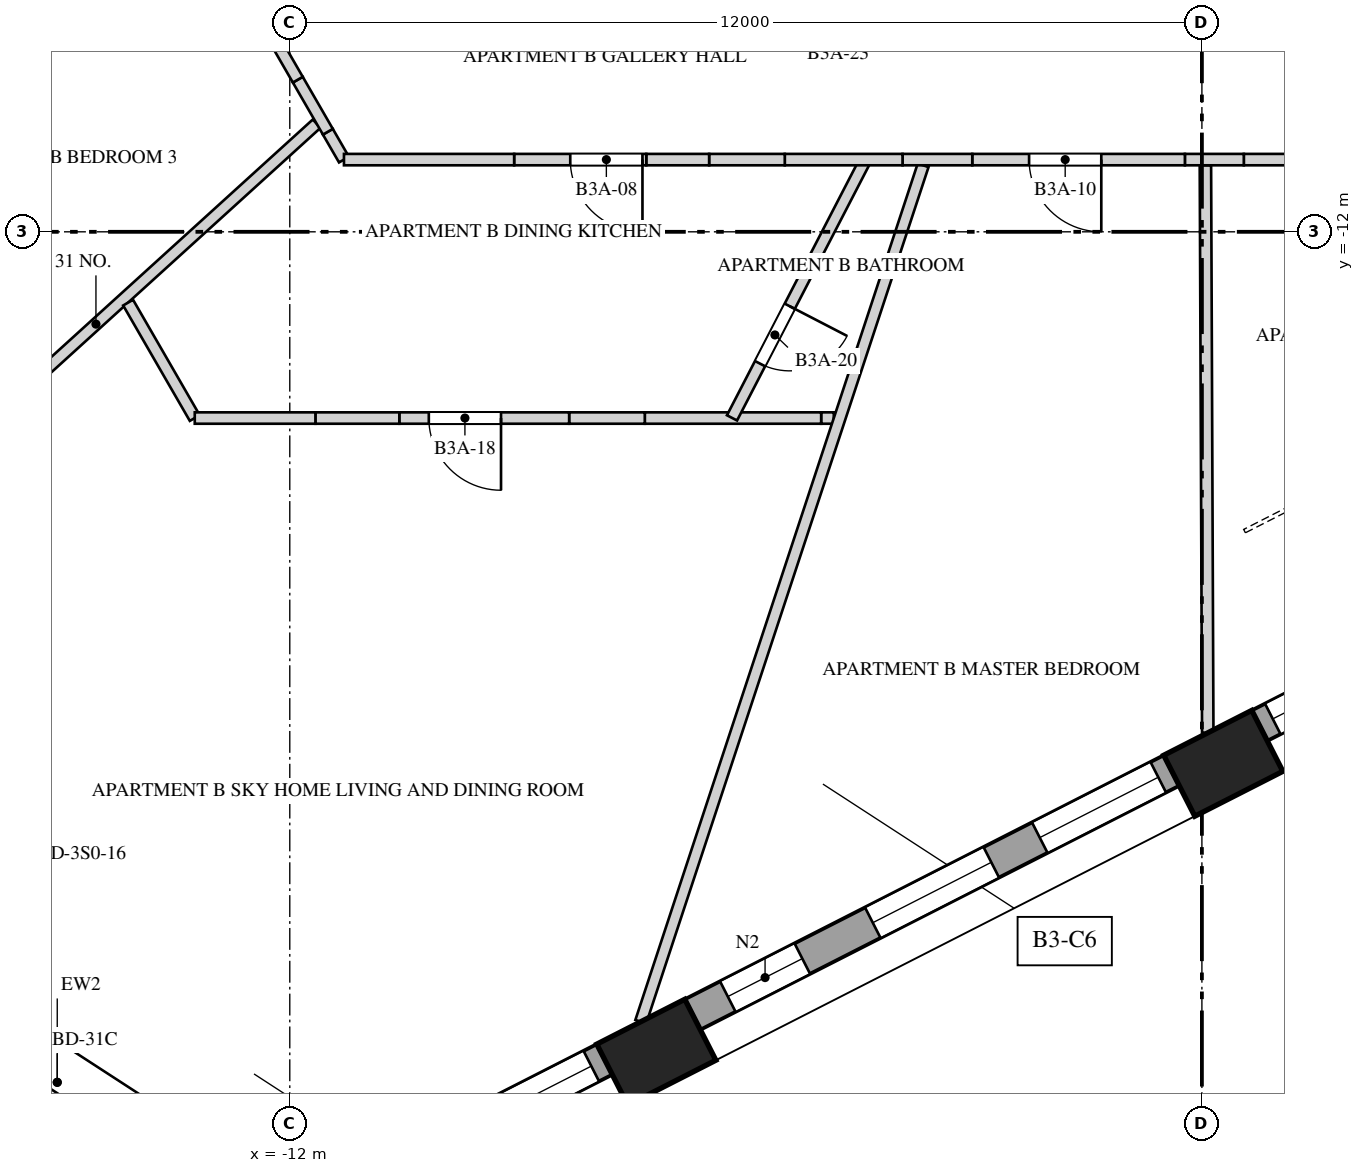
"""IFC4 building model, lengths in metres.
Left out: names, types, materials, properties, quantities, classifications, styles, units other than length and angle.
Written with IfcOpenShell. Run it as: python <this file> out.ifc"""

import sys

from ifc_helpers import new_model, si_unit, direction, frame, frame_2d, origin, origin_2d, place, context, subcontext, project, spatial, polyline, rectangle, outline, extrude, element, fill, save


model = new_model("IFC4")
c1 = context("Model", 3, precision=1e-05, world=origin(), true_north=direction((0.0, 1.0)))
c2 = subcontext(c1, "Body", "Model", "MODEL_VIEW")
j1 = project(units=[si_unit("LENGTHUNIT", "METRE"), si_unit("PLANEANGLEUNIT", "RADIAN")], contexts=[c1])
p1 = place(None, origin())
s1 = spatial("IfcSite", under=j1, at=p1, CompositionType="ELEMENT")
p2 = place(p1, origin())
s2 = spatial("IfcBuilding", under=s1, at=p2, CompositionType="ELEMENT")
p3 = place(p2, frame((0.0, 0.0, 133.6)))
s3 = spatial("IfcBuildingStorey", under=s2, at=p3, CompositionType="ELEMENT", Elevation=133.6)
for number, where, z_axis, x_axis in (
    (1, (-7.178, -22.793, 0.0), (0.0, 0.0, 1.0), (0.891, 0.454, 0.0)),
    (2, (0.281, -18.992, 0.0), (0.0, 0.0, 1.0), (0.891, 0.454, 0.0)),
):
    element("IfcColumn", number, at=place(p3, frame(where, z_axis=z_axis, x_axis=x_axis)), inside=s3, PredefinedType="COLUMN", context=c2, shape_type="SweptSolid", body=[
        extrude(rectangle(XDim=1.3, YDim=0.9, at=origin_2d()), origin(), (0.0, 0.0, 1.0), 4.0),
    ])
p4 = place(p3, frame((-13.581, -25.803, 0.0), z_axis=(0.0, 0.0, 1.0), x_axis=(0.891010191031, 0.453983303085, 0.0)))
e3 = element("IfcWall", 3, at=p4, inside=s3, PredefinedType="SOLIDWALL", context=c2, shape_type="SweptSolid", body=[
    extrude(rectangle(XDim=6.422, YDim=0.45, at=frame_2d((3.211, 0.0))), origin(), (0.0, 0.0, 1.0), 3.3),
])
p5 = place(p4, frame((0.195, 0.0, 0.5)))
e4 = element("IfcOpeningElement", 4, at=p5, cuts=e3, PredefinedType="OPENING", context=c2, shape_type="SweptSolid", body=[
    extrude(rectangle(XDim=1.1, YDim=2.0, at=frame_2d((0.55, 1.0))), frame((0.0, 0.235, 0.0), z_axis=(0.0, -1.0, 0.0), x_axis=(1.0, 0.0, 0.0)), (0.0, 0.0, 1.0), 0.47),
])
p6 = place(p4, frame((2.011, 0.0, 0.5)))
e5 = element("IfcOpeningElement", 5, at=p6, cuts=e3, PredefinedType="OPENING", context=c2, shape_type="SweptSolid", body=[
    extrude(rectangle(XDim=1.75, YDim=2.65, at=frame_2d((0.875, 1.325))), frame((0.0, 0.235, 0.0), z_axis=(0.0, -1.0, 0.0), x_axis=(1.0, 0.0, 0.0)), (0.0, 0.0, 1.0), 0.47),
])
p7 = place(p4, frame((4.476, 0.0, 0.5)))
e6 = element("IfcOpeningElement", 6, at=p7, cuts=e3, PredefinedType="OPENING", context=c2, shape_type="SweptSolid", body=[
    extrude(rectangle(XDim=1.75, YDim=2.65, at=frame_2d((0.875, 1.325))), frame((0.0, 0.235, 0.0), z_axis=(0.0, -1.0, 0.0), x_axis=(1.0, 0.0, 0.0)), (0.0, 0.0, 1.0), 0.47),
])
p8 = place(p3, frame((-6.701, -22.297, 0.0), z_axis=(0.0, 0.0, 1.0), x_axis=(0.891004189171, 0.45399508244, 0.0)))
e7 = element("IfcWall", 7, at=p8, inside=s3, PredefinedType="SOLIDWALL", context=c2, shape_type="SweptSolid", body=[
    extrude(rectangle(XDim=7.072, YDim=0.45, at=frame_2d((3.536, 0.0))), origin(), (0.0, 0.0, 1.0), 3.3),
])
p9 = place(p8, frame((0.52, 0.0, 0.5)))
e8 = element("IfcOpeningElement", 8, at=p9, cuts=e7, PredefinedType="OPENING", context=c2, shape_type="SweptSolid", body=[
    extrude(rectangle(XDim=1.1, YDim=2.65, at=frame_2d((0.55, 1.325))), frame((0.0, 0.235, 0.0), z_axis=(0.0, -1.0, 0.0), x_axis=(1.0, 0.0, 0.0)), (0.0, 0.0, 1.0), 0.47),
])
p10 = place(p8, frame((2.661, 0.0, 0.5)))
e9 = element("IfcOpeningElement", 9, at=p10, cuts=e7, PredefinedType="OPENING", context=c2, shape_type="SweptSolid", body=[
    extrude(rectangle(XDim=1.75, YDim=2.65, at=frame_2d((0.875, 1.325))), frame((0.0, 0.235, 0.0), z_axis=(0.0, -1.0, 0.0), x_axis=(1.0, 0.0, 0.0)), (0.0, 0.0, 1.0), 0.47),
])
p11 = place(p8, frame((5.126, 0.0, 0.5)))
e10 = element("IfcOpeningElement", 10, at=p11, cuts=e7, PredefinedType="OPENING", context=c2, shape_type="SweptSolid", body=[
    extrude(rectangle(XDim=1.75, YDim=2.65, at=frame_2d((0.875, 1.325))), frame((0.0, 0.235, 0.0), z_axis=(0.0, -1.0, 0.0), x_axis=(1.0, 0.0, 0.0)), (0.0, 0.0, 1.0), 0.47),
])
p12 = place(p3, frame((0.758, -18.497, 0.0), z_axis=(0.0, 0.0, 1.0), x_axis=(0.890979432498, 0.454043666254, 0.0)))
e11 = element("IfcWall", 11, at=p12, inside=s3, PredefinedType="SOLIDWALL", context=c2, shape_type="SweptSolid", body=[
    extrude(rectangle(XDim=2.141, YDim=0.45, at=frame_2d((1.07, 0.0))), origin(), (0.0, 0.0, 1.0), 3.3),
])
p13 = place(p12, frame((0.195, 0.0, 0.5)))
e12 = element("IfcOpeningElement", 12, at=p13, cuts=e11, PredefinedType="OPENING", context=c2, shape_type="SweptSolid", body=[
    extrude(rectangle(XDim=1.75, YDim=2.65, at=frame_2d((0.875, 1.325))), frame((0.0, 0.235, 0.0), z_axis=(0.0, -1.0, 0.0), x_axis=(1.0, 0.0, 0.0)), (0.0, 0.0, 1.0), 0.47),
])
p14 = place(p3, frame((-13.592, -24.142, 0.0), z_axis=(0.0, 0.0, 1.0), x_axis=(-0.838665071449, 0.544647498784, 0.0)))
e13 = element("IfcWall", 13, at=p14, inside=s3, PredefinedType="SOLIDWALL", context=c2, shape_type="SweptSolid", body=[
    extrude(rectangle(XDim=3.5, YDim=0.9, at=frame_2d((1.75, 0.0))), origin(), (0.0, 0.0, 1.0), 3.3),
])
p15 = place(p14, frame((0.75, 0.0, 0.0)))
e14 = element("IfcOpeningElement", 14, at=p15, cuts=e13, PredefinedType="OPENING", context=c2, shape_type="SweptSolid", body=[
    extrude(rectangle(XDim=2.0, YDim=2.4, at=frame_2d((1.0, 1.2))), frame((0.0, 0.46, 0.0), z_axis=(0.0, -1.0, 0.0), x_axis=(1.0, 0.0, 0.0)), (0.0, 0.0, 1.0), 0.92),
])
p16 = place(p3, frame((-17.454, -15.851, 0.0), z_axis=(0.0, 0.0, 1.0), x_axis=(0.740276567096, 0.672302464824, 0.0)))
e15 = element("IfcWall", 15, at=p16, inside=s3, PredefinedType="PARTITIONING", context=c2, shape_type="SweptSolid", body=[
    extrude(rectangle(XDim=7.844, YDim=0.15, at=frame_2d((3.922, 0.0))), origin(), (0.0, 0.0, 1.0), 2.75),
])
p17 = place(p3, frame((-13.25, -14.45, 0.0), z_axis=(0.0, 0.0, 1.0), x_axis=(-0.500047902311, 0.865997745606, 0.0)))
e16 = element("IfcWall", 16, at=p17, inside=s3, PredefinedType="PARTITIONING", context=c2, shape_type="SweptSolid", body=[
    extrude(rectangle(XDim=1.753, YDim=0.15, at=frame_2d((0.876, 0.0))), origin(), (0.0, 0.0, 1.0), 3.65),
])
p18 = place(p3, frame((-11.287, -11.05, 0.0), z_axis=(0.0, 0.0, 1.0), x_axis=(-0.499489419809, 0.866319986782, 0.0)))
e17 = element("IfcWall", 17, at=p18, inside=s3, PredefinedType="PARTITIONING", context=c2, shape_type="SweptSolid", body=[
    extrude(rectangle(XDim=0.423, YDim=0.15, at=frame_2d((0.212, 0.0))), origin(), (0.0, 0.0, 1.0), 3.65),
])
p19 = place(p3, frame((-11.499, -10.683, 0.0), z_axis=(0.0, 0.0, 1.0), x_axis=(-0.50012328804, 0.865954211699, 0.0)))
e18 = element("IfcWall", 18, at=p19, inside=s3, PredefinedType="PARTITIONING", context=c2, shape_type="SweptSolid", body=[
    extrude(rectangle(XDim=0.791, YDim=0.15, at=frame_2d((0.396, 0.0))), origin(), (0.0, 0.0, 1.0), 2.75),
])
p20 = place(p3, frame((-11.894, -9.999, 0.0), z_axis=(0.0, 0.0, 1.0), x_axis=(-0.500000251441, 0.866025258615, 0.0)))
e19 = element("IfcWall", 19, at=p20, inside=s3, PredefinedType="PARTITIONING", context=c2, shape_type="SweptSolid", body=[
    extrude(rectangle(XDim=4.209, YDim=0.15, at=frame_2d((2.105, 0.0))), origin(), (0.0, 0.0, 1.0), 3.65),
])
p21 = place(p20, frame((1.313, 0.0, 0.0)))
e20 = element("IfcOpeningElement", 20, at=p21, cuts=e19, PredefinedType="OPENING", context=c2, shape_type="SweptSolid", body=[
    extrude(rectangle(XDim=0.95, YDim=2.4, at=frame_2d((0.475, 1.2))), frame((0.0, 0.085, 0.0), z_axis=(0.0, -1.0, 0.0), x_axis=(1.0, 0.0, 0.0)), (0.0, 0.0, 1.0), 0.17),
])
p22 = place(p3, frame((-4.843, -14.45, 0.0), z_axis=(0.0, 0.0, 1.0), x_axis=(-1.0, 0.0, 0.0)))
e21 = element("IfcWall", 21, at=p22, inside=s3, PredefinedType="PARTITIONING", context=c2, shape_type="SweptSolid", body=[
    extrude(rectangle(XDim=0.166, YDim=0.15, at=frame_2d((0.083, 0.0))), origin(), (0.0, 0.0, 1.0), 2.55),
])
p23 = place(p3, frame((-5.009, -14.45, 0.0), z_axis=(0.0, 0.0, 1.0), x_axis=(-1.0, 0.0, 0.0)))
e22 = element("IfcWall", 22, at=p23, inside=s3, PredefinedType="PARTITIONING", context=c2, shape_type="SweptSolid", body=[
    extrude(rectangle(XDim=2.321, YDim=0.15, at=frame_2d((1.16, 0.0))), origin(), (0.0, 0.0, 1.0), 3.65),
])
p24 = place(p3, frame((-7.33, -14.45, 0.0), z_axis=(0.0, 0.0, 1.0), x_axis=(-1.0, 0.0, 0.0)))
e23 = element("IfcWall", 23, at=p24, inside=s3, PredefinedType="PARTITIONING", context=c2, shape_type="SweptSolid", body=[
    extrude(rectangle(XDim=0.995, YDim=0.15, at=frame_2d((0.498, 0.0))), origin(), (0.0, 0.0, 1.0), 2.55),
])
p25 = place(p3, frame((-8.325, -14.45, 0.0), z_axis=(0.0, 0.0, 1.0), x_axis=(-1.0, 0.0, 0.0)))
e24 = element("IfcWall", 24, at=p25, inside=s3, PredefinedType="PARTITIONING", context=c2, shape_type="SweptSolid", body=[
    extrude(rectangle(XDim=2.234, YDim=0.15, at=frame_2d((1.117, 0.0))), origin(), (0.0, 0.0, 1.0), 3.65),
])
p26 = place(p25, frame((0.896, 0.0, 0.0)))
e25 = element("IfcOpeningElement", 25, at=p26, cuts=e24, PredefinedType="OPENING", context=c2, shape_type="SweptSolid", body=[
    extrude(rectangle(XDim=0.95, YDim=2.4, at=frame_2d((0.475, 1.2))), frame((0.0, 0.085, 0.0), z_axis=(0.0, -1.0, 0.0), x_axis=(1.0, 0.0, 0.0)), (0.0, 0.0, 1.0), 0.17),
])
p27 = place(p3, frame((-10.559, -14.45, 0.0), z_axis=(0.0, 0.0, 1.0), x_axis=(-1.0, 0.0, 0.0)))
e26 = element("IfcWall", 26, at=p27, inside=s3, PredefinedType="PARTITIONING", context=c2, shape_type="SweptSolid", body=[
    extrude(rectangle(XDim=1.104, YDim=0.15, at=frame_2d((0.552, 0.0))), origin(), (0.0, 0.0, 1.0), 2.55),
])
p28 = place(p3, frame((-11.663, -14.45, 0.0), z_axis=(0.0, 0.0, 1.0), x_axis=(-1.0, 0.0, 0.0)))
e27 = element("IfcWall", 27, at=p28, inside=s3, PredefinedType="PARTITIONING", context=c2, shape_type="SweptSolid", body=[
    extrude(rectangle(XDim=1.587, YDim=0.15, at=frame_2d((0.794, 0.0))), origin(), (0.0, 0.0, 1.0), 3.65),
])
p29 = place(p3, frame((-4.425, -11.052, 0.0), z_axis=(0.0, 0.0, 1.0), x_axis=(-0.459481978347, -0.888187092664, 0.0)))
e28 = element("IfcWall", 28, at=p29, inside=s3, PredefinedType="PARTITIONING", context=c2, shape_type="SweptSolid", body=[
    extrude(rectangle(XDim=3.823, YDim=0.15, at=frame_2d((1.912, 0.0))), origin(), (0.0, 0.0, 1.0), 3.65),
])
p30 = place(p29, frame((2.17, 0.0, 0.0)))
e29 = element("IfcOpeningElement", 29, at=p30, cuts=e28, PredefinedType="OPENING", context=c2, shape_type="SweptSolid", body=[
    extrude(rectangle(XDim=0.85, YDim=2.4, at=frame_2d((0.425, 1.2))), frame((0.0, 0.085, 0.0), z_axis=(0.0, -1.0, 0.0), x_axis=(1.0, 0.0, 0.0)), (0.0, 0.0, 1.0), 0.17),
])
p31 = place(p3, frame((-3.668, -11.125, 0.0), z_axis=(0.0, 0.0, 1.0), x_axis=(-0.313095908813, -0.949721512805, 0.0)))
e30 = element("IfcWall", 30, at=p31, inside=s3, PredefinedType="PARTITIONING", context=c2, shape_type="SweptSolid", body=[
    extrude(rectangle(XDim=11.863, YDim=0.15, at=frame_2d((5.932, 0.0))), origin(), (0.0, 0.0, 1.0), 2.55),
])
p32 = place(p3, frame((0.046, -11.125, 0.0), z_axis=(0.0, 0.0, 1.0), x_axis=(0.004152733795, -0.999991377364, 0.0)))
e31 = element("IfcWall", 31, at=p32, inside=s3, PredefinedType="PARTITIONING", context=c2, shape_type="SweptSolid", body=[
    extrude(rectangle(XDim=7.466, YDim=0.15, at=frame_2d((3.733, 0.0))), origin(), (0.0, 0.0, 1.0), 2.75),
])
p33 = place(p3, frame((5.251, -11.05, 0.0), z_axis=(0.0, 0.0, 1.0), x_axis=(-1.0, 0.0, 0.0)))
e32 = element("IfcWall", 32, at=p33, inside=s3, PredefinedType="PARTITIONING", context=c2, shape_type="SweptSolid", body=[
    extrude(rectangle(XDim=4.7, YDim=0.15, at=frame_2d((2.35, 0.0))), origin(), (0.0, 0.0, 1.0), 3.65),
])
p34 = place(p33, frame((1.94, 0.0, 0.0)))
e33 = element("IfcOpeningElement", 33, at=p34, cuts=e32, PredefinedType="OPENING", context=c2, shape_type="SweptSolid", body=[
    extrude(rectangle(XDim=0.95, YDim=2.4, at=frame_2d((0.475, 1.2))), frame((0.0, 0.085, 0.0), z_axis=(0.0, -1.0, 0.0), x_axis=(1.0, 0.0, 0.0)), (0.0, 0.0, 1.0), 0.17),
])
p35 = place(p3, frame((0.551, -11.05, 0.0), z_axis=(0.0, 0.0, 1.0), x_axis=(-1.0, 0.0, 0.0)))
e34 = element("IfcWall", 34, at=p35, inside=s3, PredefinedType="PARTITIONING", context=c2, shape_type="SweptSolid", body=[
    extrude(rectangle(XDim=0.775, YDim=0.15, at=frame_2d((0.388, 0.0))), origin(), (0.0, 0.0, 1.0), 2.75),
])
p36 = place(p3, frame((-0.224, -11.05, 0.0), z_axis=(0.0, 0.0, 1.0), x_axis=(-1.0, 0.0, 0.0)))
e35 = element("IfcWall", 35, at=p36, inside=s3, PredefinedType="PARTITIONING", context=c2, shape_type="SweptSolid", body=[
    extrude(rectangle(XDim=2.797, YDim=0.15, at=frame_2d((1.398, 0.0))), origin(), (0.0, 0.0, 1.0), 3.65),
])
p37 = place(p36, frame((1.1, 0.0, 0.0)))
e36 = element("IfcOpeningElement", 36, at=p37, cuts=e35, PredefinedType="OPENING", context=c2, shape_type="SweptSolid", body=[
    extrude(rectangle(XDim=0.95, YDim=2.4, at=frame_2d((0.475, 1.2))), frame((0.0, 0.085, 0.0), z_axis=(0.0, -1.0, 0.0), x_axis=(1.0, 0.0, 0.0)), (0.0, 0.0, 1.0), 0.17),
])
p38 = place(p3, frame((-3.021, -11.05, 0.0), z_axis=(0.0, 0.0, 1.0), x_axis=(-1.0, 0.0, 0.0)))
e37 = element("IfcWall", 37, at=p38, inside=s3, PredefinedType="PARTITIONING", context=c2, shape_type="SweptSolid", body=[
    extrude(rectangle(XDim=0.917, YDim=0.15, at=frame_2d((0.459, 0.0))), origin(), (0.0, 0.0, 1.0), 2.55),
])
p39 = place(p3, frame((-3.938, -11.05, 0.0), z_axis=(0.0, 0.0, 1.0), x_axis=(-1.0, 0.0, 0.0)))
e38 = element("IfcWall", 38, at=p39, inside=s3, PredefinedType="PARTITIONING", context=c2, shape_type="SweptSolid", body=[
    extrude(rectangle(XDim=1.549, YDim=0.15, at=frame_2d((0.775, 0.0))), origin(), (0.0, 0.0, 1.0), 3.65),
])
p40 = place(p3, frame((-5.488, -11.05, 0.0), z_axis=(0.0, 0.0, 1.0), x_axis=(-1.0, 0.0, 0.0)))
e39 = element("IfcWall", 39, at=p40, inside=s3, PredefinedType="PARTITIONING", context=c2, shape_type="SweptSolid", body=[
    extrude(rectangle(XDim=0.995, YDim=0.15, at=frame_2d((0.498, 0.0))), origin(), (0.0, 0.0, 1.0), 2.55),
])
p41 = place(p3, frame((-6.483, -11.05, 0.0), z_axis=(0.0, 0.0, 1.0), x_axis=(-1.0, 0.0, 0.0)))
e40 = element("IfcWall", 40, at=p41, inside=s3, PredefinedType="PARTITIONING", context=c2, shape_type="SweptSolid", body=[
    extrude(rectangle(XDim=0.827, YDim=0.15, at=frame_2d((0.414, 0.0))), origin(), (0.0, 0.0, 1.0), 3.65),
])
p42 = place(p3, frame((-7.31, -11.05, 0.0), z_axis=(0.0, 0.0, 1.0), x_axis=(-1.0, 0.0, 0.0)))
e41 = element("IfcWall", 41, at=p42, inside=s3, PredefinedType="PARTITIONING", context=c2, shape_type="SweptSolid", body=[
    extrude(outline(polyline([(0.0, 0.0), (1.738, 0.0), (1.738, 2.55), (0.635, 2.55), (0.635, 3.65), (0.0, 3.65), (0.0, 0.0)])), frame((0.0, 0.075, 0.0), z_axis=(0.0, -1.0, 0.0), x_axis=(1.0, 0.0, 0.0)), (0.0, 0.0, 1.0), 0.15),
])
p43 = place(p42, frame((0.05, 0.0, 0.0)))
e42 = element("IfcOpeningElement", 42, at=p43, cuts=e41, PredefinedType="OPENING", context=c2, shape_type="SweptSolid", body=[
    extrude(rectangle(XDim=0.95, YDim=2.4, at=frame_2d((0.475, 1.2))), frame((0.0, 0.085, 0.0), z_axis=(0.0, -1.0, 0.0), x_axis=(1.0, 0.0, 0.0)), (0.0, 0.0, 1.0), 0.17),
])
p44 = place(p3, frame((-9.048, -11.05, 0.0), z_axis=(0.0, 0.0, 1.0), x_axis=(-1.0, 0.0, 0.0)))
e43 = element("IfcWall", 43, at=p44, inside=s3, PredefinedType="PARTITIONING", context=c2, shape_type="SweptSolid", body=[
    extrude(rectangle(XDim=2.239, YDim=0.15, at=frame_2d((1.119, 0.0))), origin(), (0.0, 0.0, 1.0), 3.65),
])
p45 = place(p7, origin())
e44 = element("IfcWindow", 44, at=p45, inside=s3, PartitioningType="SINGLE_PANEL", PredefinedType="WINDOW", context=c2, shape_type="SweptSolid", body=[
    extrude(rectangle(XDim=1.75, YDim=2.65, at=frame_2d((0.875, 1.325))), frame((0.0, 0.03, 0.0), z_axis=(0.0, -1.0, 0.0), x_axis=(1.0, 0.0, 0.0)), (0.0, 0.0, 1.0), 0.06),
])
fill(e6, e44)
p46 = place(p9, origin())
e45 = element("IfcWindow", 45, at=p46, inside=s3, PartitioningType="SINGLE_PANEL", PredefinedType="WINDOW", context=c2, shape_type="SweptSolid", body=[
    extrude(rectangle(XDim=1.1, YDim=2.65, at=frame_2d((0.55, 1.325))), frame((0.0, 0.03, 0.0), z_axis=(0.0, -1.0, 0.0), x_axis=(1.0, 0.0, 0.0)), (0.0, 0.0, 1.0), 0.06),
])
fill(e8, e45)
p47 = place(p10, origin())
e46 = element("IfcWindow", 46, at=p47, inside=s3, PartitioningType="SINGLE_PANEL", PredefinedType="WINDOW", context=c2, shape_type="SweptSolid", body=[
    extrude(rectangle(XDim=1.75, YDim=2.65, at=frame_2d((0.875, 1.325))), frame((0.0, 0.03, 0.0), z_axis=(0.0, -1.0, 0.0), x_axis=(1.0, 0.0, 0.0)), (0.0, 0.0, 1.0), 0.06),
])
fill(e9, e46)
p48 = place(p11, origin())
e47 = element("IfcWindow", 47, at=p48, inside=s3, PartitioningType="SINGLE_PANEL", PredefinedType="WINDOW", context=c2, shape_type="SweptSolid", body=[
    extrude(rectangle(XDim=1.75, YDim=2.65, at=frame_2d((0.875, 1.325))), frame((0.0, 0.03, 0.0), z_axis=(0.0, -1.0, 0.0), x_axis=(1.0, 0.0, 0.0)), (0.0, 0.0, 1.0), 0.06),
])
fill(e10, e47)
p49 = place(p13, origin())
e48 = element("IfcWindow", 48, at=p49, inside=s3, PartitioningType="SINGLE_PANEL", PredefinedType="WINDOW", context=c2, shape_type="SweptSolid", body=[
    extrude(rectangle(XDim=1.75, YDim=2.65, at=frame_2d((0.875, 1.325))), frame((0.0, 0.03, 0.0), z_axis=(0.0, -1.0, 0.0), x_axis=(1.0, 0.0, 0.0)), (0.0, 0.0, 1.0), 0.06),
])
fill(e12, e48)
p50 = place(p15, origin())
e49 = element("IfcDoor", 49, at=p50, inside=s3, OperationType="SLIDING_TO_LEFT", PredefinedType="DOOR", context=c2, shape_type="SweptSolid", body=[
    extrude(rectangle(XDim=2.0, YDim=2.4, at=frame_2d((1.0, 1.2))), frame((0.0, 0.025, 0.0), z_axis=(0.0, -1.0, 0.0), x_axis=(1.0, 0.0, 0.0)), (0.0, 0.0, 1.0), 0.05),
])
fill(e14, e49)
p51 = place(p43, origin())
e50 = element("IfcDoor", 50, at=p51, inside=s3, OperationType="SINGLE_SWING_RIGHT", PredefinedType="DOOR", context=c2, shape_type="SweptSolid", body=[
    extrude(rectangle(XDim=0.95, YDim=2.4, at=frame_2d((0.475, 1.2))), frame((0.0, 0.025, 0.0), z_axis=(0.0, -1.0, 0.0), x_axis=(1.0, 0.0, 0.0)), (0.0, 0.0, 1.0), 0.05),
])
fill(e42, e50)
p52 = place(p37, origin())
e51 = element("IfcDoor", 51, at=p52, inside=s3, OperationType="SINGLE_SWING_RIGHT", PredefinedType="DOOR", context=c2, shape_type="SweptSolid", body=[
    extrude(rectangle(XDim=0.95, YDim=2.4, at=frame_2d((0.475, 1.2))), frame((0.0, 0.025, 0.0), z_axis=(0.0, -1.0, 0.0), x_axis=(1.0, 0.0, 0.0)), (0.0, 0.0, 1.0), 0.05),
])
fill(e36, e51)
p53 = place(p26, origin())
e52 = element("IfcDoor", 52, at=p53, inside=s3, OperationType="SINGLE_SWING_RIGHT", PredefinedType="DOOR", context=c2, shape_type="SweptSolid", body=[
    extrude(rectangle(XDim=0.95, YDim=2.4, at=frame_2d((0.475, 1.2))), frame((0.0, 0.025, 0.0), z_axis=(0.0, -1.0, 0.0), x_axis=(1.0, 0.0, 0.0)), (0.0, 0.0, 1.0), 0.05),
])
fill(e25, e52)
p54 = place(p30, origin())
e53 = element("IfcDoor", 53, at=p54, inside=s3, OperationType="SINGLE_SWING_RIGHT", PredefinedType="DOOR", context=c2, shape_type="SweptSolid", body=[
    extrude(rectangle(XDim=0.85, YDim=2.4, at=frame_2d((0.425, 1.2))), frame((0.0, 0.025, 0.0), z_axis=(0.0, -1.0, 0.0), x_axis=(1.0, 0.0, 0.0)), (0.0, 0.0, 1.0), 0.05),
])
fill(e29, e53)
save(model, sys.argv[1])
